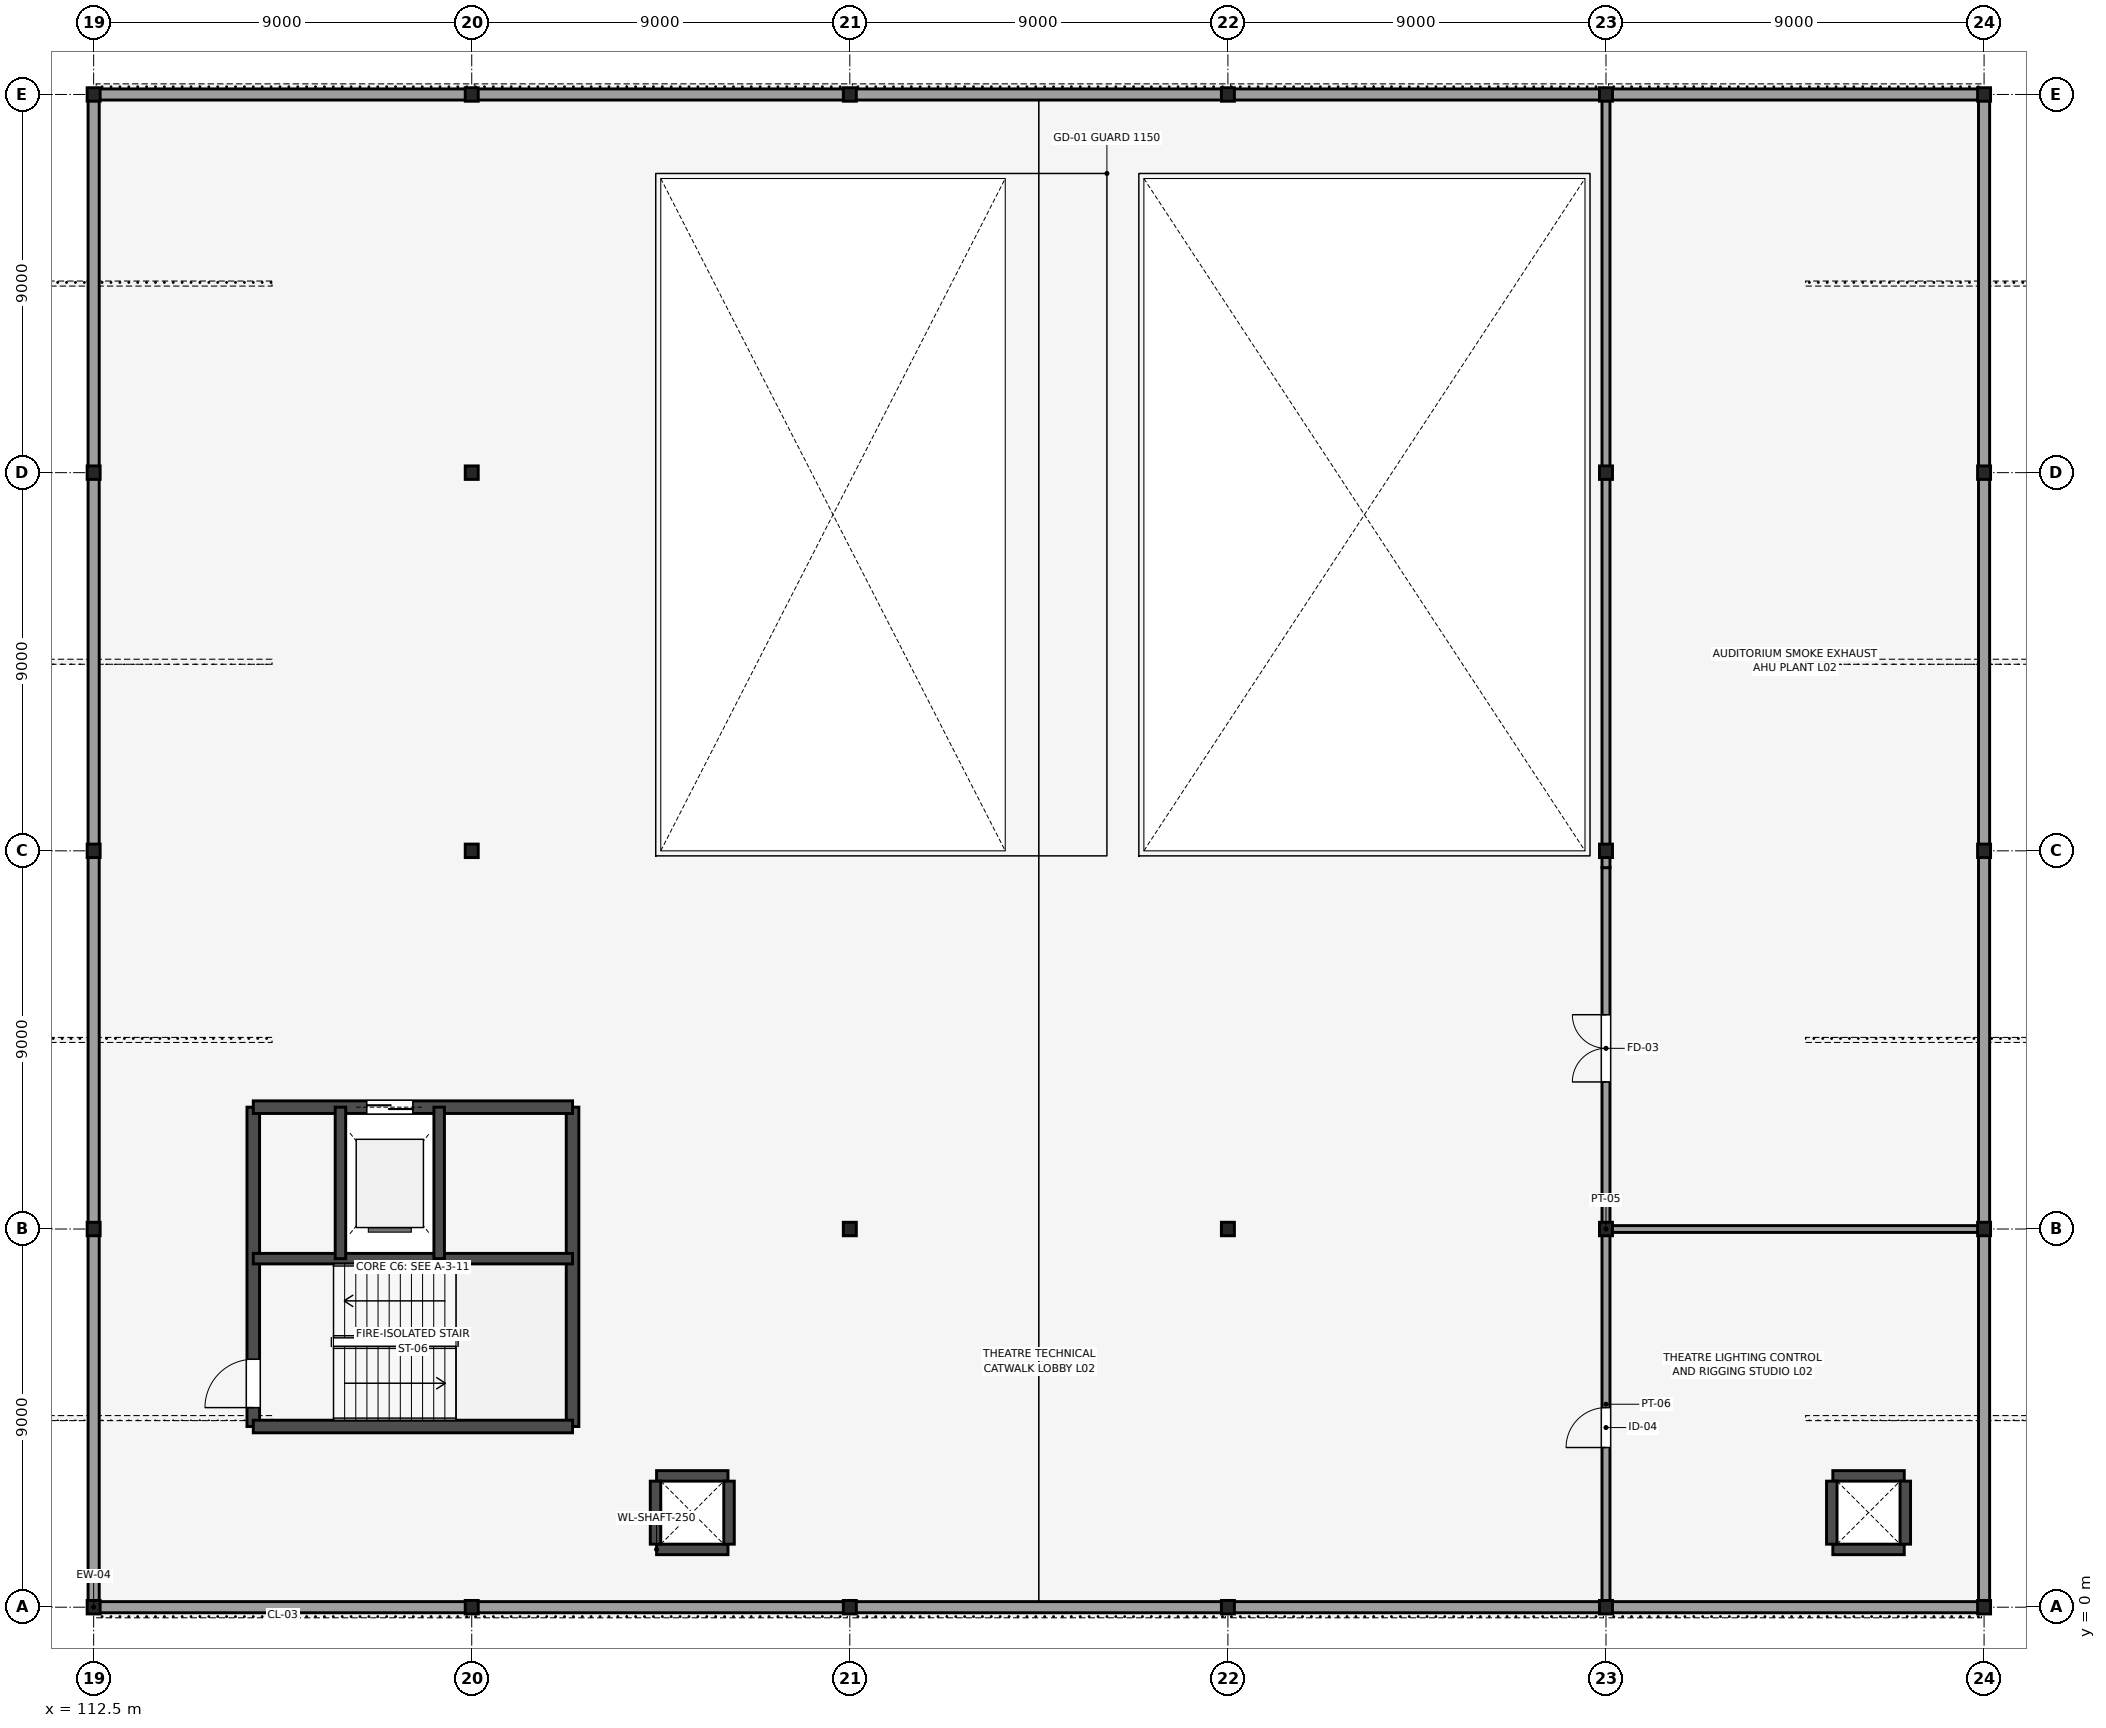
"""IFC4 building model, lengths in metres.
Left out: names, types, materials, properties, quantities, classifications, styles, units other than length and angle.
Written with IfcOpenShell. Run it as: python <this file> out.ifc"""

import sys

from ifc_helpers import new_model, si_unit, direction, frame, frame_2d, origin, origin_2d, place, context, subcontext, project, spatial, rectangle, i_section, extrude, element, fill, save


model = new_model("IFC4")
c1 = context("Model", 3, precision=1e-05, world=origin(), true_north=direction((0.0, 1.0)))
c2 = subcontext(c1, "Body", "Model", "MODEL_VIEW")
j1 = project(units=[si_unit("LENGTHUNIT", "METRE"), si_unit("PLANEANGLEUNIT", "RADIAN")], contexts=[c1])
p1 = place(None, origin())
s1 = spatial("IfcSite", under=j1, at=p1, CompositionType="ELEMENT")
p2 = place(p1, origin())
s2 = spatial("IfcBuilding", under=s1, at=p2, CompositionType="ELEMENT")
p3 = place(p2, frame((0.0, 0.0, 9.9)))
s3 = spatial("IfcBuildingStorey", under=s2, at=p3, CompositionType="ELEMENT", Elevation=9.9)
for number, where, z_axis, x_axis in (
    (1, (112.5, 0.0, 0.0), (0.0, 0.0, 1.0), (1.0, 0.0, 0.0)),
    (2, (112.5, 9.0, 0.0), (0.0, 0.0, 1.0), (1.0, 0.0, 0.0)),
    (3, (112.5, 18.0, 0.0), (0.0, 0.0, 1.0), (1.0, 0.0, 0.0)),
    (4, (112.5, 27.0, 0.0), (0.0, 0.0, 1.0), (1.0, 0.0, 0.0)),
    (5, (112.5, 36.0, 0.0), (0.0, 0.0, 1.0), (1.0, 0.0, 0.0)),
    (6, (121.5, 0.0, 0.0), (0.0, 0.0, 1.0), (1.0, 0.0, 0.0)),
    (7, (121.5, 18.0, 0.0), (0.0, 0.0, 1.0), (1.0, 0.0, 0.0)),
    (8, (121.5, 27.0, 0.0), (0.0, 0.0, 1.0), (1.0, 0.0, 0.0)),
    (9, (121.5, 36.0, 0.0), (0.0, 0.0, 1.0), (1.0, 0.0, 0.0)),
    (10, (130.5, 0.0, 0.0), (0.0, 0.0, 1.0), (1.0, 0.0, 0.0)),
    (11, (130.5, 9.0, 0.0), (0.0, 0.0, 1.0), (1.0, 0.0, 0.0)),
    (12, (130.5, 36.0, 0.0), (0.0, 0.0, 1.0), (1.0, 0.0, 0.0)),
    (13, (139.5, 0.0, 0.0), (0.0, 0.0, 1.0), (1.0, 0.0, 0.0)),
    (14, (139.5, 9.0, 0.0), (0.0, 0.0, 1.0), (1.0, 0.0, 0.0)),
    (15, (139.5, 36.0, 0.0), (0.0, 0.0, 1.0), (1.0, 0.0, 0.0)),
    (16, (148.5, 0.0, 0.0), (0.0, 0.0, 1.0), (1.0, 0.0, 0.0)),
    (17, (148.5, 9.0, 0.0), (0.0, 0.0, 1.0), (1.0, 0.0, 0.0)),
    (18, (148.5, 18.0, 0.0), (0.0, 0.0, 1.0), (1.0, 0.0, 0.0)),
    (19, (148.5, 27.0, 0.0), (0.0, 0.0, 1.0), (1.0, 0.0, 0.0)),
    (20, (148.5, 36.0, 0.0), (0.0, 0.0, 1.0), (1.0, 0.0, 0.0)),
    (21, (157.5, 0.0, 0.0), (0.0, 0.0, 1.0), (1.0, 0.0, 0.0)),
    (22, (157.5, 9.0, 0.0), (0.0, 0.0, 1.0), (1.0, 0.0, 0.0)),
    (23, (157.5, 18.0, 0.0), (0.0, 0.0, 1.0), (1.0, 0.0, 0.0)),
    (24, (157.5, 27.0, 0.0), (0.0, 0.0, 1.0), (1.0, 0.0, 0.0)),
    (25, (157.5, 36.0, 0.0), (0.0, 0.0, 1.0), (1.0, 0.0, 0.0)),
):
    element("IfcColumn", number, at=place(p3, frame(where, z_axis=z_axis, x_axis=x_axis)), inside=s3, PredefinedType="COLUMN", context=c2, shape_type="SweptSolid", body=[
        extrude(i_section(OverallWidth=0.309, OverallDepth=0.321, WebThickness=0.014, FlangeThickness=0.022, FilletRadius=0.017, at=origin_2d()), origin(), (0.0, 0.0, 1.0), 4.5),
    ])
p4 = place(p3, frame((116.3, 4.3, 0.0), z_axis=(0.0, 0.0, 1.0), x_axis=(0.0, 1.0, 0.0)))
e26 = element("IfcWall", 26, at=p4, inside=s3, PredefinedType="SHEAR", context=c2, shape_type="SweptSolid", body=[
    extrude(rectangle(XDim=7.6, YDim=0.3, at=frame_2d((3.8, 0.0))), origin(), (0.0, 0.0, 1.0), 4.5),
])
p5 = place(p4, frame((0.45, 0.0, 0.0)))
e27 = element("IfcOpeningElement", 27, at=p5, cuts=e26, PredefinedType="OPENING", context=c2, shape_type="SweptSolid", body=[
    extrude(rectangle(XDim=1.15, YDim=2.15, at=frame_2d((0.575, 1.075))), frame((0.0, 0.16, 0.0), z_axis=(0.0, -1.0, 0.0), x_axis=(1.0, 0.0, 0.0)), (0.0, 0.0, 1.0), 0.32),
])
for number, where, z_axis, x_axis in (
    (28, (123.9, 4.3, 0.0), (0.0, 0.0, 1.0), (0.0, 1.0, 0.0)),
    (29, (116.3, 4.3, 0.0), (0.0, 0.0, 1.0), (1.0, 0.0, 0.0)),
):
    element("IfcWall", number, at=place(p3, frame(where, z_axis=z_axis, x_axis=x_axis)), inside=s3, PredefinedType="SHEAR", context=c2, shape_type="SweptSolid", body=[
        extrude(rectangle(XDim=7.6, YDim=0.3, at=frame_2d((3.8, 0.0))), origin(), (0.0, 0.0, 1.0), 4.5),
    ])
p6 = place(p3, frame((116.3, 11.9, 0.0), z_axis=(0.0, 0.0, 1.0), x_axis=(1.0, 0.0, 0.0)))
e30 = element("IfcWall", 30, at=p6, inside=s3, PredefinedType="SHEAR", context=c2, shape_type="SweptSolid", body=[
    extrude(rectangle(XDim=7.6, YDim=0.3, at=frame_2d((3.8, 0.0))), origin(), (0.0, 0.0, 1.0), 4.5),
])
p7 = place(p6, frame((2.7, 0.0, 0.0)))
e31 = element("IfcOpeningElement", 31, at=p7, cuts=e30, PredefinedType="OPENING", context=c2, shape_type="SweptSolid", body=[
    extrude(rectangle(XDim=1.1, YDim=2.2, at=frame_2d((0.55, 1.1))), frame((0.0, 0.16, 0.0), z_axis=(0.0, -1.0, 0.0), x_axis=(1.0, 0.0, 0.0)), (0.0, 0.0, 1.0), 0.32),
])
p8 = place(p3, frame((116.3, 8.295, 0.0), z_axis=(0.0, 0.0, 1.0), x_axis=(1.0, 0.0, 0.0)))
e32 = element("IfcWall", 32, at=p8, inside=s3, PredefinedType="SHEAR", context=c2, shape_type="SweptSolid", body=[
    extrude(rectangle(XDim=7.6, YDim=0.25, at=frame_2d((3.8, 0.0))), origin(), (0.0, 0.0, 1.0), 4.5),
])
for number, where, z_axis, x_axis in (
    (33, (118.375, 8.295, 0.0), (0.0, 0.0, 1.0), (0.0, 1.0, 0.0)),
    (34, (120.725, 8.295, 0.0), (0.0, 0.0, 1.0), (0.0, 1.0, 0.0)),
):
    element("IfcWall", number, at=place(p3, frame(where, z_axis=z_axis, x_axis=x_axis)), inside=s3, PredefinedType="SHEAR", context=c2, shape_type="SweptSolid", body=[
        extrude(rectangle(XDim=3.605, YDim=0.25, at=frame_2d((1.802, 0.0))), origin(), (0.0, 0.0, 1.0), 4.5),
    ])
for number, where, z_axis, x_axis in (
    (35, (125.9, 1.375, 0.0), (0.0, 0.0, 1.0), (1.0, 0.0, 0.0)),
    (36, (125.9, 3.125, 0.0), (0.0, 0.0, 1.0), (1.0, 0.0, 0.0)),
):
    element("IfcWall", number, at=place(p3, frame(where, z_axis=z_axis, x_axis=x_axis)), inside=s3, PredefinedType="SHEAR", context=c2, shape_type="SweptSolid", body=[
        extrude(rectangle(XDim=1.7, YDim=0.25, at=frame_2d((0.85, 0.0))), origin(), (0.0, 0.0, 1.0), 3.77),
    ])
for number, where, z_axis, x_axis in (
    (37, (125.875, 1.5, 0.0), (0.0, 0.0, 1.0), (0.0, 1.0, 0.0)),
    (38, (127.625, 1.5, 0.0), (0.0, 0.0, 1.0), (0.0, 1.0, 0.0)),
):
    element("IfcWall", number, at=place(p3, frame(where, z_axis=z_axis, x_axis=x_axis)), inside=s3, PredefinedType="SHEAR", context=c2, shape_type="SweptSolid", body=[
        extrude(rectangle(XDim=1.5, YDim=0.25, at=frame_2d((0.75, 0.0))), origin(), (0.0, 0.0, 1.0), 3.77),
    ])
for number, where, z_axis, x_axis in (
    (39, (153.9, 1.375, 0.0), (0.0, 0.0, 1.0), (1.0, 0.0, 0.0)),
    (40, (153.9, 3.125, 0.0), (0.0, 0.0, 1.0), (1.0, 0.0, 0.0)),
):
    element("IfcWall", number, at=place(p3, frame(where, z_axis=z_axis, x_axis=x_axis)), inside=s3, PredefinedType="SHEAR", context=c2, shape_type="SweptSolid", body=[
        extrude(rectangle(XDim=1.7, YDim=0.25, at=frame_2d((0.85, 0.0))), origin(), (0.0, 0.0, 1.0), 3.77),
    ])
for number, where, z_axis, x_axis in (
    (41, (153.875, 1.5, 0.0), (0.0, 0.0, 1.0), (0.0, 1.0, 0.0)),
    (42, (155.625, 1.5, 0.0), (0.0, 0.0, 1.0), (0.0, 1.0, 0.0)),
):
    element("IfcWall", number, at=place(p3, frame(where, z_axis=z_axis, x_axis=x_axis)), inside=s3, PredefinedType="SHEAR", context=c2, shape_type="SweptSolid", body=[
        extrude(rectangle(XDim=1.5, YDim=0.25, at=frame_2d((0.75, 0.0))), origin(), (0.0, 0.0, 1.0), 3.77),
    ])
for number, where, z_axis, x_axis in (
    (43, (112.5, 0.0, 0.0), (0.0, 0.0, 1.0), (1.0, 0.0, 0.0)),
    (44, (121.5, 36.0, 0.0), (0.0, 0.0, 1.0), (-1.0, 0.0, 0.0)),
    (45, (121.5, 0.0, 0.0), (0.0, 0.0, 1.0), (1.0, 0.0, 0.0)),
    (46, (130.5, 36.0, 0.0), (0.0, 0.0, 1.0), (-1.0, 0.0, 0.0)),
    (47, (130.5, 0.0, 0.0), (0.0, 0.0, 1.0), (1.0, 0.0, 0.0)),
    (48, (139.5, 36.0, 0.0), (0.0, 0.0, 1.0), (-1.0, 0.0, 0.0)),
    (49, (139.5, 0.0, 0.0), (0.0, 0.0, 1.0), (1.0, 0.0, 0.0)),
    (50, (148.5, 36.0, 0.0), (0.0, 0.0, 1.0), (-1.0, 0.0, 0.0)),
    (51, (148.5, 0.0, 0.0), (0.0, 0.0, 1.0), (1.0, 0.0, 0.0)),
    (52, (157.5, 36.0, 0.0), (0.0, 0.0, 1.0), (-1.0, 0.0, 0.0)),
    (53, (112.5, 9.0, 0.0), (0.0, 0.0, 1.0), (0.0, -1.0, 0.0)),
    (54, (157.5, 0.0, 0.0), (0.0, 0.0, 1.0), (0.0, 1.0, 0.0)),
    (55, (112.5, 18.0, 0.0), (0.0, 0.0, 1.0), (0.0, -1.0, 0.0)),
    (56, (157.5, 9.0, 0.0), (0.0, 0.0, 1.0), (0.0, 1.0, 0.0)),
    (57, (112.5, 27.0, 0.0), (0.0, 0.0, 1.0), (0.0, -1.0, 0.0)),
    (58, (157.5, 18.0, 0.0), (0.0, 0.0, 1.0), (0.0, 1.0, 0.0)),
    (59, (112.5, 36.0, 0.0), (0.0, 0.0, 1.0), (0.0, -1.0, 0.0)),
    (60, (157.5, 27.0, 0.0), (0.0, 0.0, 1.0), (0.0, 1.0, 0.0)),
):
    element("IfcWall", number, at=place(p3, frame(where, z_axis=z_axis, x_axis=x_axis)), inside=s3, PredefinedType="STANDARD", context=c2, shape_type="SweptSolid", body=[
        extrude(rectangle(XDim=9.0, YDim=0.265, at=frame_2d((4.5, 0.0))), origin(), (0.0, 0.0, 1.0), 3.781),
    ])
p9 = place(p3, frame((148.5, 0.0, 0.0), z_axis=(0.0, 0.0, 1.0), x_axis=(0.0, 1.0, 0.0)))
e61 = element("IfcWall", 61, at=p9, inside=s3, PredefinedType="PARTITIONING", context=c2, shape_type="SweptSolid", body=[
    extrude(rectangle(XDim=9.0, YDim=0.19, at=frame_2d((4.5, 0.0))), origin(), (0.0, 0.0, 1.0), 3.781),
])
p10 = place(p9, frame((3.8, 0.0, 0.0)))
e62 = element("IfcOpeningElement", 62, at=p10, cuts=e61, PredefinedType="OPENING", context=c2, shape_type="SweptSolid", body=[
    extrude(rectangle(XDim=0.95, YDim=2.15, at=frame_2d((0.475, 1.075))), frame((0.0, 0.105, 0.0), z_axis=(0.0, -1.0, 0.0), x_axis=(1.0, 0.0, 0.0)), (0.0, 0.0, 1.0), 0.21),
])
p11 = place(p3, frame((148.5, 9.0, 0.0), z_axis=(0.0, 0.0, 1.0), x_axis=(0.0, 1.0, 0.0)))
e63 = element("IfcWall", 63, at=p11, inside=s3, PredefinedType="PARTITIONING", context=c2, shape_type="SweptSolid", body=[
    extrude(rectangle(XDim=8.6, YDim=0.19, at=frame_2d((4.3, 0.0))), origin(), (0.0, 0.0, 1.0), 3.781),
])
p12 = place(p11, frame((3.5, 0.0, 0.0)))
e64 = element("IfcOpeningElement", 64, at=p12, cuts=e63, PredefinedType="OPENING", context=c2, shape_type="SweptSolid", body=[
    extrude(rectangle(XDim=1.6, YDim=2.2, at=frame_2d((0.8, 1.1))), frame((0.0, 0.105, 0.0), z_axis=(0.0, -1.0, 0.0), x_axis=(1.0, 0.0, 0.0)), (0.0, 0.0, 1.0), 0.21),
])
p13 = place(p3, frame((148.5, 17.6, 0.0), z_axis=(0.0, 0.0, 1.0), x_axis=(0.0, 1.0, 0.0)))
e65 = element("IfcWall", 65, at=p13, inside=s3, PredefinedType="PARTITIONING", context=c2, shape_type="SweptSolid", body=[
    extrude(rectangle(XDim=18.4, YDim=0.19, at=frame_2d((9.2, 0.0))), origin(), (0.0, 0.0, 1.0), 3.781),
])
p14 = place(p3, frame((148.5, 9.0, 0.0), z_axis=(0.0, 0.0, 1.0), x_axis=(1.0, 0.0, 0.0)))
e66 = element("IfcWall", 66, at=p14, inside=s3, PredefinedType="PARTITIONING", context=c2, shape_type="SweptSolid", body=[
    extrude(rectangle(XDim=9.0, YDim=0.162, at=frame_2d((4.5, 0.0))), origin(), (0.0, 0.0, 1.0), 3.702),
])
p15 = place(p5, origin())
e67 = element("IfcDoor", 67, at=p15, inside=s3, OperationType="SINGLE_SWING_LEFT", PredefinedType="DOOR", context=c2, shape_type="SweptSolid", body=[
    extrude(rectangle(XDim=1.15, YDim=2.15, at=frame_2d((0.575, 1.075))), frame((0.0, 0.025, 0.0), z_axis=(0.0, -1.0, 0.0), x_axis=(1.0, 0.0, 0.0)), (0.0, 0.0, 1.0), 0.05),
])
fill(e27, e67)
p16 = place(p7, origin())
e68 = element("IfcDoor", 68, at=p16, inside=s3, OperationType="DOUBLE_DOOR_SLIDING", PredefinedType="DOOR", context=c2, shape_type="SweptSolid", body=[
    extrude(rectangle(XDim=1.1, YDim=2.2, at=frame_2d((0.55, 1.1))), frame((0.0, 0.025, 0.0), z_axis=(0.0, -1.0, 0.0), x_axis=(1.0, 0.0, 0.0)), (0.0, 0.0, 1.0), 0.05),
])
fill(e31, e68)
p17 = place(p10, origin())
e69 = element("IfcDoor", 69, at=p17, inside=s3, OperationType="SINGLE_SWING_LEFT", PredefinedType="DOOR", context=c2, shape_type="SweptSolid", body=[
    extrude(rectangle(XDim=0.95, YDim=2.15, at=frame_2d((0.475, 1.075))), frame((0.0, 0.025, 0.0), z_axis=(0.0, -1.0, 0.0), x_axis=(1.0, 0.0, 0.0)), (0.0, 0.0, 1.0), 0.05),
])
fill(e62, e69)
p18 = place(p12, origin())
e70 = element("IfcDoor", 70, at=p18, inside=s3, OperationType="DOUBLE_DOOR_SINGLE_SWING", PredefinedType="DOOR", context=c2, shape_type="SweptSolid", body=[
    extrude(rectangle(XDim=1.6, YDim=2.2, at=frame_2d((0.8, 1.1))), frame((0.0, 0.025, 0.0), z_axis=(0.0, -1.0, 0.0), x_axis=(1.0, 0.0, 0.0)), (0.0, 0.0, 1.0), 0.05),
])
fill(e64, e70)
save(model, sys.argv[1])
